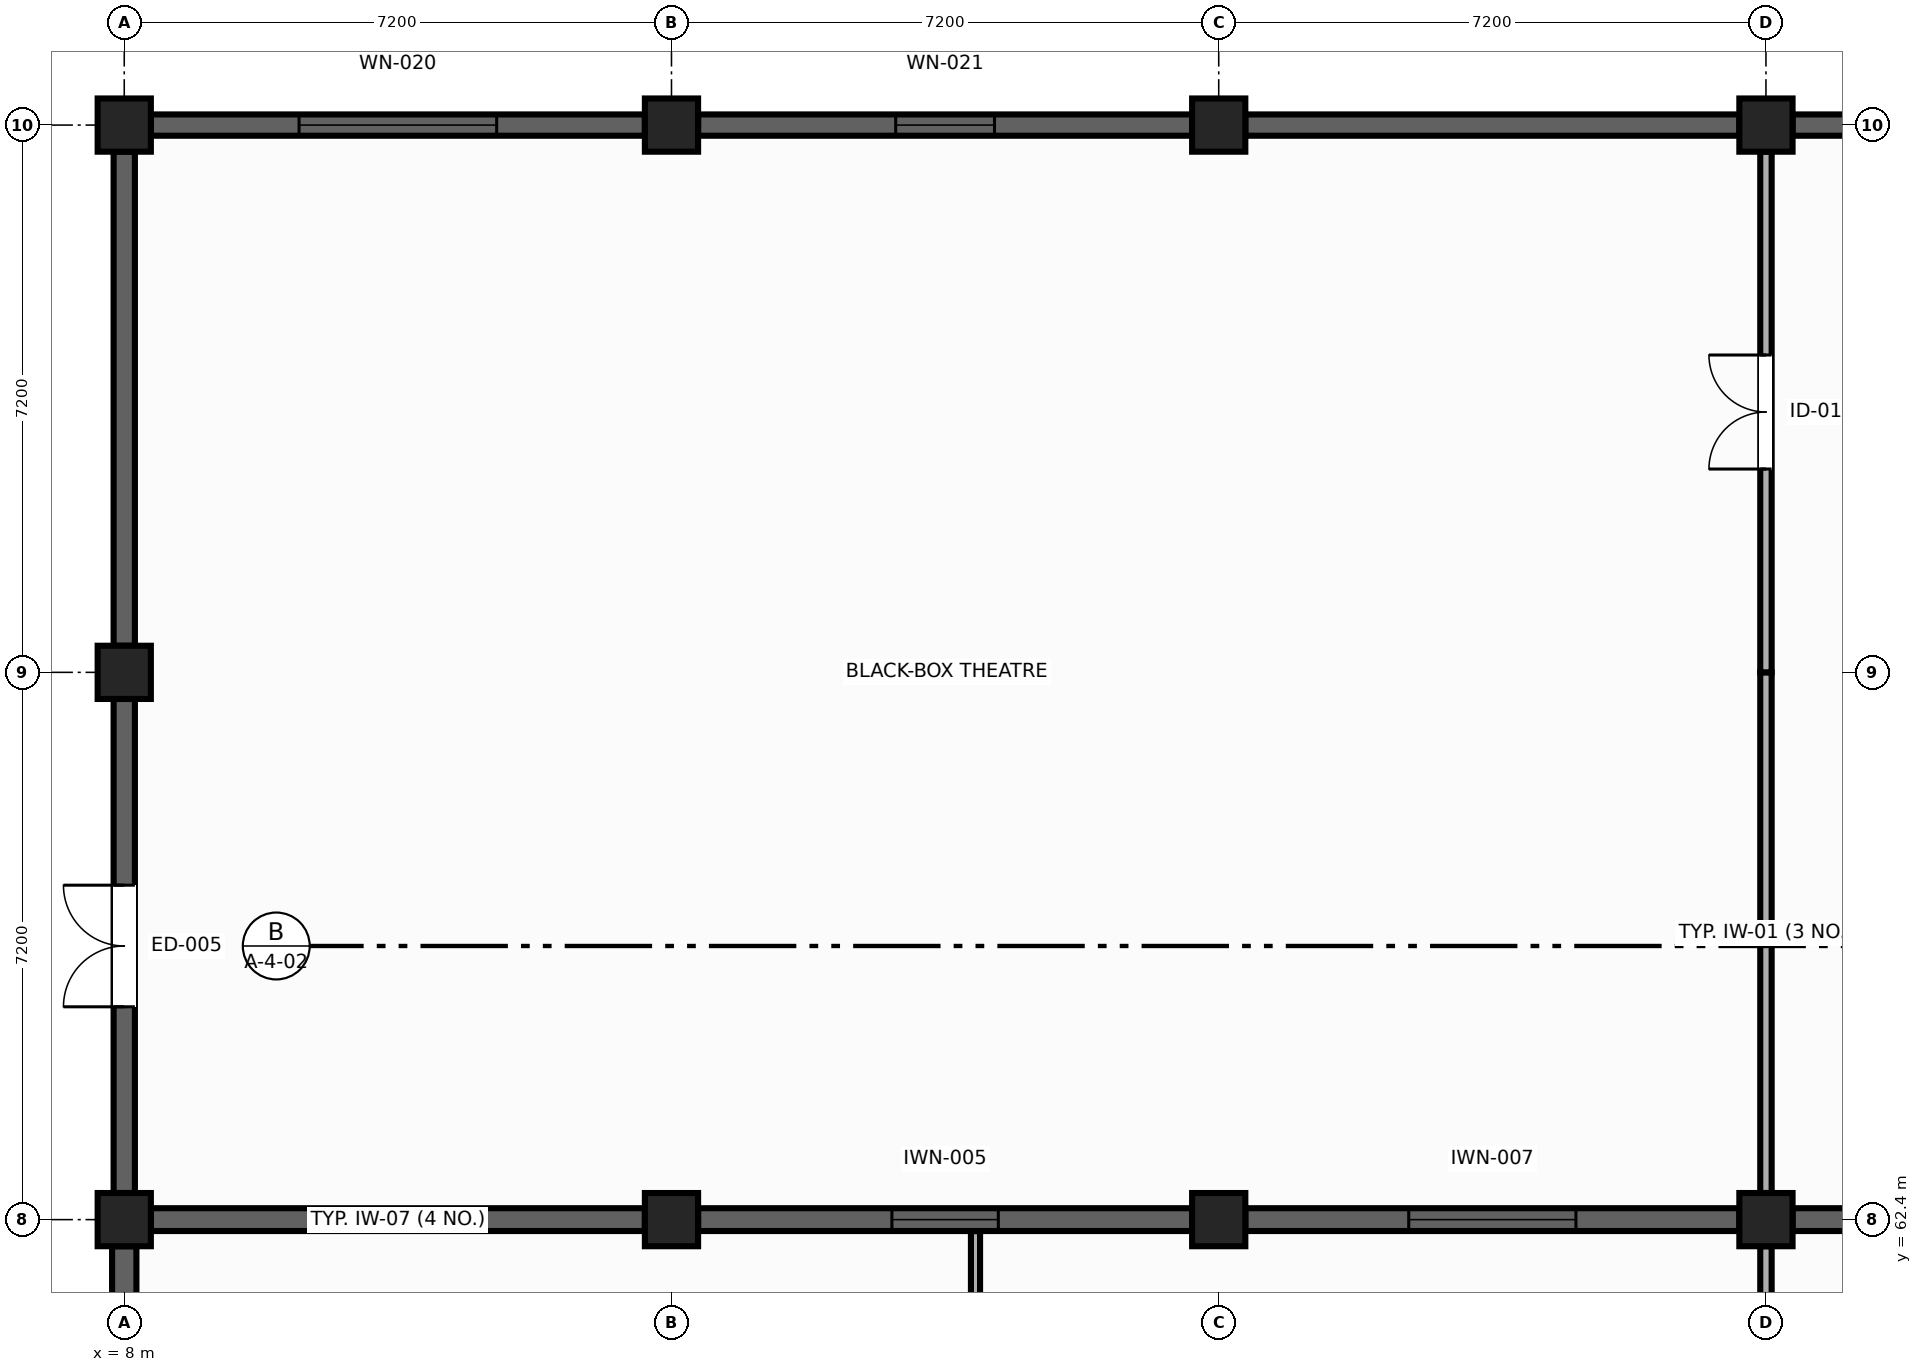
"""IFC4 building model, lengths in metres.
Left out: names, types, materials, properties, quantities, classifications, styles, units other than length and angle.
Written with IfcOpenShell. Run it as: python <this file> out.ifc"""

import sys

from ifc_helpers import new_model, si_unit, direction, frame, frame_2d, origin, origin_2d, place, context, subcontext, project, spatial, rectangle, extrude, element, fill, save


model = new_model("IFC4")
c1 = context("Model", 3, precision=1e-05, world=origin(), true_north=direction((0.0, 1.0)))
c2 = subcontext(c1, "Body", "Model", "MODEL_VIEW")
j1 = project(units=[si_unit("LENGTHUNIT", "METRE"), si_unit("PLANEANGLEUNIT", "RADIAN")], contexts=[c1])
p1 = place(None, origin())
s1 = spatial("IfcSite", under=j1, at=p1, CompositionType="ELEMENT")
p2 = place(p1, origin())
s2 = spatial("IfcBuilding", under=s1, at=p2, CompositionType="ELEMENT")
p3 = place(p2, origin())
s3 = spatial("IfcBuildingStorey", under=s2, at=p3, CompositionType="ELEMENT", Elevation=0.0)
for number, where, z_axis, x_axis in (
    (1, (8.0, 62.4, 0.0), (0.0, 0.0, 1.0), (1.0, 0.0, 0.0)),
    (2, (15.2, 62.4, 0.0), (0.0, 0.0, 1.0), (0.0, 1.0, 0.0)),
    (3, (22.4, 62.4, 0.0), (0.0, 0.0, 1.0), (1.0, 0.0, 0.0)),
    (4, (29.6, 62.4, 0.0), (0.0, 0.0, 1.0), (1.0, 0.0, 0.0)),
    (5, (8.0, 69.6, 0.0), (0.0, 0.0, 1.0), (0.0, 1.0, 0.0)),
    (6, (8.0, 76.8, 0.0), (0.0, 0.0, 1.0), (1.0, 0.0, 0.0)),
    (7, (15.2, 76.8, 0.0), (0.0, 0.0, 1.0), (1.0, 0.0, 0.0)),
    (8, (22.4, 76.8, 0.0), (0.0, 0.0, 1.0), (0.0, 1.0, 0.0)),
    (9, (29.6, 76.8, 0.0), (0.0, 0.0, 1.0), (1.0, 0.0, 0.0)),
):
    element("IfcColumn", number, at=place(p3, frame(where, z_axis=z_axis, x_axis=x_axis)), inside=s3, PredefinedType="COLUMN", context=c2, shape_type="SweptSolid", body=[
        extrude(rectangle(XDim=0.7, YDim=0.7, at=origin_2d()), origin(), (0.0, 0.0, 1.0), 5.4),
    ])
p4 = place(p3, frame((8.0, 55.55, 0.0), z_axis=(0.0, 0.0, 1.0), x_axis=(0.0, 1.0, 0.0)))
e10 = element("IfcWall", 10, at=p4, inside=s3, PredefinedType="SOLIDWALL", context=c2, shape_type="SweptSolid", body=[
    extrude(rectangle(XDim=6.5, YDim=0.32, at=frame_2d((3.25, 0.0))), origin(), (0.0, 0.0, 1.0), 5.12),
])
p5 = place(p3, frame((8.0, 62.75, 0.0), z_axis=(0.0, 0.0, 1.0), x_axis=(0.0, 1.0, 0.0)))
e11 = element("IfcWall", 11, at=p5, inside=s3, PredefinedType="SOLIDWALL", context=c2, shape_type="SweptSolid", body=[
    extrude(rectangle(XDim=6.5, YDim=0.28, at=frame_2d((3.25, 0.0))), origin(), (0.0, 0.0, 1.0), 5.15),
])
p6 = place(p5, frame((2.45, 0.0, 0.0)))
e12 = element("IfcOpeningElement", 12, at=p6, cuts=e11, PredefinedType="OPENING", context=c2, shape_type="SweptSolid", body=[
    extrude(rectangle(XDim=1.6, YDim=2.2, at=frame_2d((0.8, 1.1))), frame((0.0, 0.15, 0.0), z_axis=(0.0, -1.0, 0.0), x_axis=(1.0, 0.0, 0.0)), (0.0, 0.0, 1.0), 0.3),
])
p7 = place(p3, frame((8.0, 69.95, 0.0), z_axis=(0.0, 0.0, 1.0), x_axis=(0.0, 1.0, 0.0)))
e13 = element("IfcWall", 13, at=p7, inside=s3, PredefinedType="SOLIDWALL", context=c2, shape_type="SweptSolid", body=[
    extrude(rectangle(XDim=6.5, YDim=0.28, at=frame_2d((3.25, 0.0))), origin(), (0.0, 0.0, 1.0), 5.15),
])
p8 = place(p3, frame((8.35, 76.8, 0.0), z_axis=(0.0, 0.0, 1.0), x_axis=(1.0, 0.0, 0.0)))
e14 = element("IfcWall", 14, at=p8, inside=s3, PredefinedType="SOLIDWALL", context=c2, shape_type="SweptSolid", body=[
    extrude(rectangle(XDim=6.5, YDim=0.28, at=frame_2d((3.25, 0.0))), origin(), (0.0, 0.0, 1.0), 5.15),
])
p9 = place(p8, frame((1.95, 0.0, 0.9)))
e15 = element("IfcOpeningElement", 15, at=p9, cuts=e14, PredefinedType="OPENING", context=c2, shape_type="SweptSolid", body=[
    extrude(rectangle(XDim=2.6, YDim=2.4, at=frame_2d((1.3, 1.2))), frame((0.0, 0.15, 0.0), z_axis=(0.0, -1.0, 0.0), x_axis=(1.0, 0.0, 0.0)), (0.0, 0.0, 1.0), 0.3),
])
p10 = place(p3, frame((15.55, 76.8, 0.0), z_axis=(0.0, 0.0, 1.0), x_axis=(1.0, 0.0, 0.0)))
e16 = element("IfcWall", 16, at=p10, inside=s3, PredefinedType="SOLIDWALL", context=c2, shape_type="SweptSolid", body=[
    extrude(rectangle(XDim=6.5, YDim=0.28, at=frame_2d((3.25, 0.0))), origin(), (0.0, 0.0, 1.0), 5.15),
])
p11 = place(p10, frame((2.6, 0.0, 0.9)))
e17 = element("IfcOpeningElement", 17, at=p11, cuts=e16, PredefinedType="OPENING", context=c2, shape_type="SweptSolid", body=[
    extrude(rectangle(XDim=1.3, YDim=1.6, at=frame_2d((0.65, 0.8))), frame((0.0, 0.15, 0.0), z_axis=(0.0, -1.0, 0.0), x_axis=(1.0, 0.0, 0.0)), (0.0, 0.0, 1.0), 0.3),
])
p12 = place(p3, frame((22.75, 76.8, 0.0), z_axis=(0.0, 0.0, 1.0), x_axis=(1.0, 0.0, 0.0)))
e18 = element("IfcWall", 18, at=p12, inside=s3, PredefinedType="SOLIDWALL", context=c2, shape_type="SweptSolid", body=[
    extrude(rectangle(XDim=6.5, YDim=0.28, at=frame_2d((3.25, 0.0))), origin(), (0.0, 0.0, 1.0), 5.15),
])
p13 = place(p3, frame((29.95, 76.8, 0.0), z_axis=(0.0, 0.0, 1.0), x_axis=(1.0, 0.0, 0.0)))
e19 = element("IfcWall", 19, at=p13, inside=s3, PredefinedType="SOLIDWALL", context=c2, shape_type="SweptSolid", body=[
    extrude(rectangle(XDim=6.5, YDim=0.28, at=frame_2d((3.25, 0.0))), origin(), (0.0, 0.0, 1.0), 5.15),
])
p14 = place(p13, frame((2.4, 0.0, 0.9)))
e20 = element("IfcOpeningElement", 20, at=p14, cuts=e19, PredefinedType="OPENING", context=c2, shape_type="SweptSolid", body=[
    extrude(rectangle(XDim=1.7, YDim=1.6, at=frame_2d((0.85, 0.8))), frame((0.0, 0.15, 0.0), z_axis=(0.0, -1.0, 0.0), x_axis=(1.0, 0.0, 0.0)), (0.0, 0.0, 1.0), 0.3),
])
p15 = place(p3, frame((8.35, 62.4, 0.0), z_axis=(0.0, 0.0, 1.0), x_axis=(1.0, 0.0, 0.0)))
e21 = element("IfcWall", 21, at=p15, inside=s3, PredefinedType="SHEAR", context=c2, shape_type="SweptSolid", body=[
    extrude(rectangle(XDim=6.5, YDim=0.3, at=frame_2d((3.25, 0.0))), origin(), (0.0, 0.0, 1.0), 5.12),
])
p16 = place(p3, frame((15.55, 62.4, 0.0), z_axis=(0.0, 0.0, 1.0), x_axis=(1.0, 0.0, 0.0)))
e22 = element("IfcWall", 22, at=p16, inside=s3, PredefinedType="SHEAR", context=c2, shape_type="SweptSolid", body=[
    extrude(rectangle(XDim=6.5, YDim=0.3, at=frame_2d((3.25, 0.0))), origin(), (0.0, 0.0, 1.0), 5.12),
])
p17 = place(p16, frame((2.55, 0.0, 1.1)))
e23 = element("IfcOpeningElement", 23, at=p17, cuts=e22, PredefinedType="OPENING", context=c2, shape_type="SweptSolid", body=[
    extrude(rectangle(XDim=1.4, YDim=1.3, at=frame_2d((0.7, 0.65))), frame((0.0, 0.16, 0.0), z_axis=(0.0, -1.0, 0.0), x_axis=(1.0, 0.0, 0.0)), (0.0, 0.0, 1.0), 0.32),
])
p18 = place(p3, frame((22.75, 62.4, 0.0), z_axis=(0.0, 0.0, 1.0), x_axis=(1.0, 0.0, 0.0)))
e24 = element("IfcWall", 24, at=p18, inside=s3, PredefinedType="SHEAR", context=c2, shape_type="SweptSolid", body=[
    extrude(rectangle(XDim=6.5, YDim=0.3, at=frame_2d((3.25, 0.0))), origin(), (0.0, 0.0, 1.0), 5.12),
])
p19 = place(p18, frame((2.15, 0.0, 1.1)))
e25 = element("IfcOpeningElement", 25, at=p19, cuts=e24, PredefinedType="OPENING", context=c2, shape_type="SweptSolid", body=[
    extrude(rectangle(XDim=2.2, YDim=1.3, at=frame_2d((1.1, 0.65))), frame((0.0, 0.16, 0.0), z_axis=(0.0, -1.0, 0.0), x_axis=(1.0, 0.0, 0.0)), (0.0, 0.0, 1.0), 0.32),
])
p20 = place(p3, frame((29.95, 62.4, 0.0), z_axis=(0.0, 0.0, 1.0), x_axis=(1.0, 0.0, 0.0)))
e26 = element("IfcWall", 26, at=p20, inside=s3, PredefinedType="SHEAR", context=c2, shape_type="SweptSolid", body=[
    extrude(rectangle(XDim=6.5, YDim=0.3, at=frame_2d((3.25, 0.0))), origin(), (0.0, 0.0, 1.0), 5.12),
])
p21 = place(p20, frame((2.35, 0.0, 0.0)))
e27 = element("IfcOpeningElement", 27, at=p21, cuts=e26, PredefinedType="OPENING", context=c2, shape_type="SweptSolid", body=[
    extrude(rectangle(XDim=1.8, YDim=2.3, at=frame_2d((0.9, 1.15))), frame((0.0, 0.16, 0.0), z_axis=(0.0, -1.0, 0.0), x_axis=(1.0, 0.0, 0.0)), (0.0, 0.0, 1.0), 0.32),
])
p22 = place(p3, frame((19.2, 55.2, 0.0), z_axis=(0.0, 0.0, 1.0), x_axis=(0.0, 1.0, 0.0)))
e28 = element("IfcWall", 28, at=p22, inside=s3, PredefinedType="PARTITIONING", context=c2, shape_type="SweptSolid", body=[
    extrude(rectangle(XDim=7.048, YDim=0.12, at=frame_2d((3.524, 0.0))), origin(), (0.0, 0.0, 1.0), 4.315),
])
p23 = place(p22, frame((2.624, 0.0, 1.1)))
e29 = element("IfcOpeningElement", 29, at=p23, cuts=e28, PredefinedType="OPENING", context=c2, shape_type="SweptSolid", body=[
    extrude(rectangle(XDim=1.8, YDim=1.3, at=frame_2d((0.9, 0.65))), frame((0.0, 0.07, 0.0), z_axis=(0.0, -1.0, 0.0), x_axis=(1.0, 0.0, 0.0)), (0.0, 0.0, 1.0), 0.14),
])
p24 = place(p3, frame((29.6, 62.05, 0.0), z_axis=(0.0, 0.0, 1.0), x_axis=(0.0, -1.0, 0.0)))
e30 = element("IfcWall", 30, at=p24, inside=s3, PredefinedType="PARTITIONING", context=c2, shape_type="SweptSolid", body=[
    extrude(rectangle(XDim=3.65, YDim=0.15, at=frame_2d((1.825, 0.0))), origin(), (0.0, 0.0, 1.0), 4.315),
])
p25 = place(p3, frame((29.6, 62.75, 0.0), z_axis=(0.0, 0.0, 1.0), x_axis=(0.0, 1.0, 0.0)))
e31 = element("IfcWall", 31, at=p25, inside=s3, PredefinedType="PARTITIONING", context=c2, shape_type="SweptSolid", body=[
    extrude(rectangle(XDim=6.85, YDim=0.15, at=frame_2d((3.425, 0.0))), origin(), (0.0, 0.0, 1.0), 5.15),
])
p26 = place(p3, frame((29.6, 69.6, 0.0), z_axis=(0.0, 0.0, 1.0), x_axis=(0.0, 1.0, 0.0)))
e32 = element("IfcWall", 32, at=p26, inside=s3, PredefinedType="PARTITIONING", context=c2, shape_type="SweptSolid", body=[
    extrude(rectangle(XDim=6.85, YDim=0.15, at=frame_2d((3.425, 0.0))), origin(), (0.0, 0.0, 1.0), 5.15),
])
p27 = place(p26, frame((2.675, 0.0, 0.0)))
e33 = element("IfcOpeningElement", 33, at=p27, cuts=e32, PredefinedType="OPENING", context=c2, shape_type="SweptSolid", body=[
    extrude(rectangle(XDim=1.5, YDim=2.2, at=frame_2d((0.75, 1.1))), frame((0.0, 0.085, 0.0), z_axis=(0.0, -1.0, 0.0), x_axis=(1.0, 0.0, 0.0)), (0.0, 0.0, 1.0), 0.17),
])
p28 = place(p6, origin())
e34 = element("IfcDoor", 34, at=p28, inside=s3, OperationType="DOUBLE_DOOR_SINGLE_SWING", PredefinedType="DOOR", context=c2, shape_type="SweptSolid", body=[
    extrude(rectangle(XDim=1.6, YDim=2.2, at=frame_2d((0.8, 1.1))), frame((0.0, 0.025, 0.0), z_axis=(0.0, -1.0, 0.0), x_axis=(1.0, 0.0, 0.0)), (0.0, 0.0, 1.0), 0.05),
])
fill(e12, e34)
p29 = place(p9, origin())
e35 = element("IfcWindow", 35, at=p29, inside=s3, PartitioningType="SINGLE_PANEL", PredefinedType="WINDOW", context=c2, shape_type="SweptSolid", body=[
    extrude(rectangle(XDim=2.6, YDim=2.4, at=frame_2d((1.3, 1.2))), frame((0.0, 0.03, 0.0), z_axis=(0.0, -1.0, 0.0), x_axis=(1.0, 0.0, 0.0)), (0.0, 0.0, 1.0), 0.06),
])
fill(e15, e35)
p30 = place(p11, origin())
e36 = element("IfcWindow", 36, at=p30, inside=s3, PartitioningType="SINGLE_PANEL", PredefinedType="WINDOW", context=c2, shape_type="SweptSolid", body=[
    extrude(rectangle(XDim=1.3, YDim=1.6, at=frame_2d((0.65, 0.8))), frame((0.0, 0.03, 0.0), z_axis=(0.0, -1.0, 0.0), x_axis=(1.0, 0.0, 0.0)), (0.0, 0.0, 1.0), 0.06),
])
fill(e17, e36)
p31 = place(p17, origin())
e37 = element("IfcWindow", 37, at=p31, inside=s3, PartitioningType="SINGLE_PANEL", PredefinedType="WINDOW", context=c2, shape_type="SweptSolid", body=[
    extrude(rectangle(XDim=1.4, YDim=1.3, at=frame_2d((0.7, 0.65))), frame((0.0, 0.03, 0.0), z_axis=(0.0, -1.0, 0.0), x_axis=(1.0, 0.0, 0.0)), (0.0, 0.0, 1.0), 0.06),
])
fill(e23, e37)
p32 = place(p19, origin())
e38 = element("IfcWindow", 38, at=p32, inside=s3, PartitioningType="SINGLE_PANEL", PredefinedType="WINDOW", context=c2, shape_type="SweptSolid", body=[
    extrude(rectangle(XDim=2.2, YDim=1.3, at=frame_2d((1.1, 0.65))), frame((0.0, 0.03, 0.0), z_axis=(0.0, -1.0, 0.0), x_axis=(1.0, 0.0, 0.0)), (0.0, 0.0, 1.0), 0.06),
])
fill(e25, e38)
p33 = place(p27, origin())
e39 = element("IfcDoor", 39, at=p33, inside=s3, OperationType="DOUBLE_DOOR_SINGLE_SWING", PredefinedType="DOOR", context=c2, shape_type="SweptSolid", body=[
    extrude(rectangle(XDim=1.5, YDim=2.2, at=frame_2d((0.75, 1.1))), frame((0.0, 0.025, 0.0), z_axis=(0.0, -1.0, 0.0), x_axis=(1.0, 0.0, 0.0)), (0.0, 0.0, 1.0), 0.05),
])
fill(e33, e39)
save(model, sys.argv[1])
